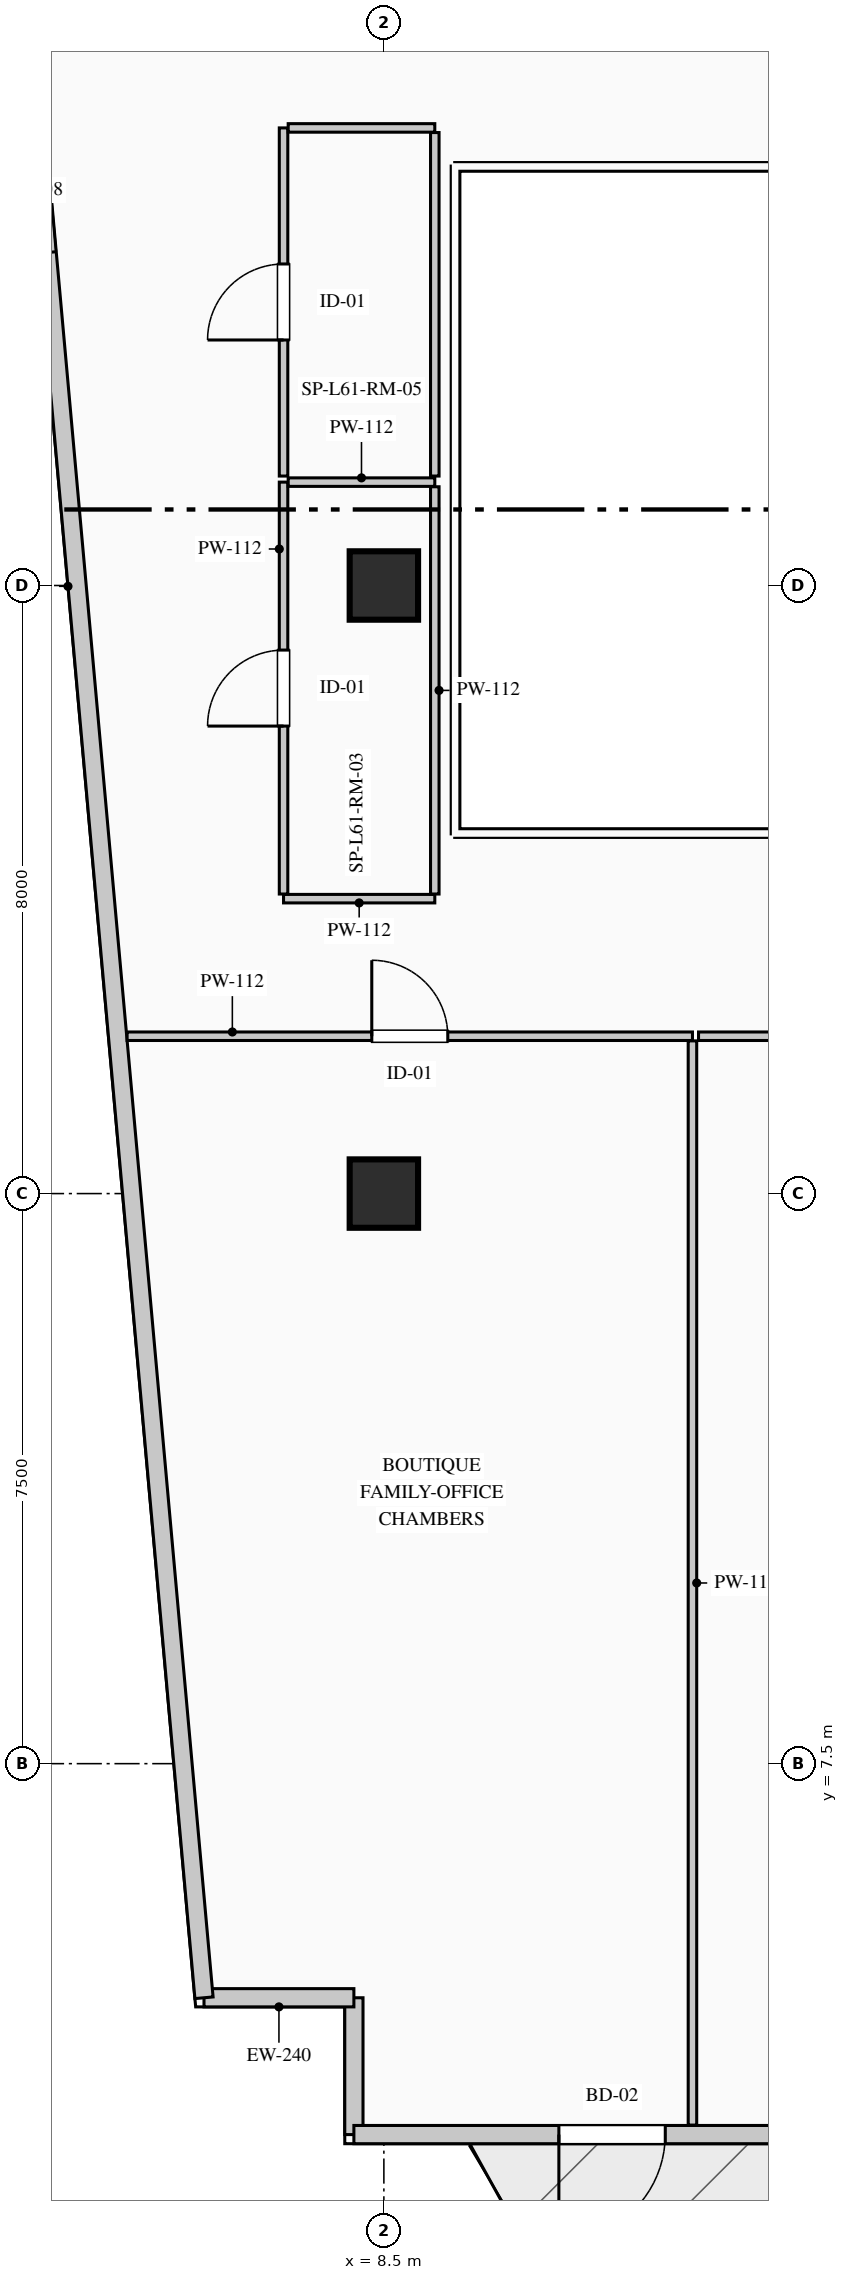
"""IFC4 building model, lengths in metres.
Left out: names, types, materials, properties, quantities, classifications, styles, units other than length and angle.
Written with IfcOpenShell. Run it as: python <this file> out.ifc"""

import sys

from ifc_helpers import new_model, si_unit, direction, frame, frame_2d, origin, origin_2d, place, context, subcontext, project, spatial, rectangle, extrude, element, fill, save


model = new_model("IFC4")
c1 = context("Model", 3, precision=1e-05, world=origin(), true_north=direction((0.0, 1.0)))
c2 = subcontext(c1, "Body", "Model", "MODEL_VIEW")
j1 = project(units=[si_unit("LENGTHUNIT", "METRE"), si_unit("PLANEANGLEUNIT", "RADIAN")], contexts=[c1])
p1 = place(None, origin())
s1 = spatial("IfcSite", under=j1, at=p1, CompositionType="ELEMENT")
p2 = place(p1, origin())
s2 = spatial("IfcBuilding", under=s1, at=p2, CompositionType="ELEMENT")
p3 = place(p2, frame((0.0, 0.0, 256.7)))
s3 = spatial("IfcBuildingStorey", under=s2, at=p3, CompositionType="ELEMENT", Elevation=256.7)
for number, where, z_axis, x_axis in (
    (1, (8.5, 15.0, 0.0), (0.0, 0.0, 1.0), (1.0, 0.0, 0.0)),
    (2, (8.5, 23.0, 0.0), (0.0, 0.0, 1.0), (1.0, 0.0, 0.0)),
):
    element("IfcColumn", number, at=place(p3, frame(where, z_axis=z_axis, x_axis=x_axis)), inside=s3, PredefinedType="COLUMN", context=c2, shape_type="SweptSolid", body=[
        extrude(rectangle(XDim=0.9, YDim=0.9, at=origin_2d()), origin(), (0.0, 0.0, 1.0), 3.95),
    ])
p4 = place(p3, frame((8.105, 2.62, 0.0), z_axis=(0.0, 0.0, 1.0), x_axis=(0.0, 1.0, 0.0)))
e3 = element("IfcWall", 3, at=p4, inside=s3, PredefinedType="STANDARD", context=c2, shape_type="SweptSolid", body=[
    extrude(rectangle(XDim=1.8, YDim=0.24, at=frame_2d((0.9, 0.0))), origin(), (0.0, 0.0, 1.0), 3.7),
])
p5 = place(p3, frame((8.105, 4.42, 0.0), z_axis=(0.0, 0.0, 1.0), x_axis=(-1.0, 0.0, 0.0)))
e4 = element("IfcWall", 4, at=p5, inside=s3, PredefinedType="STANDARD", context=c2, shape_type="SweptSolid", body=[
    extrude(rectangle(XDim=1.972, YDim=0.24, at=frame_2d((0.986, 0.0))), origin(), (0.0, 0.0, 1.0), 3.7),
])
p6 = place(p3, frame((6.133, 4.42, 0.0), z_axis=(0.0, 0.0, 1.0), x_axis=(-0.089522678378, 0.995984784048, 0.0)))
e5 = element("IfcWall", 5, at=p6, inside=s3, PredefinedType="STANDARD", context=c2, shape_type="SweptSolid", body=[
    extrude(rectangle(XDim=37.31, YDim=0.24, at=frame_2d((18.655, 0.0))), origin(), (0.0, 0.0, 1.0), 3.7),
])
p7 = place(p6, frame((23.053, 0.0, 0.9)))
e6 = element("IfcOpeningElement", 6, at=p7, cuts=e5, PredefinedType="OPENING", context=c2, shape_type="SweptSolid", body=[
    extrude(rectangle(XDim=1.65, YDim=1.95, at=frame_2d((0.825, 0.975))), frame((0.0, 0.13, 0.0), z_axis=(0.0, -1.0, 0.0), x_axis=(1.0, 0.0, 0.0)), (0.0, 0.0, 1.0), 0.26),
])
p8 = place(p3, frame((16.513, 2.62, 0.0), z_axis=(0.0, 0.0, 1.0), x_axis=(-1.0, 0.0, 0.0)))
e7 = element("IfcWall", 7, at=p8, inside=s3, PredefinedType="STANDARD", context=c2, shape_type="SweptSolid", body=[
    extrude(rectangle(XDim=8.408, YDim=0.24, at=frame_2d((4.204, 0.0))), origin(), (0.0, 0.0, 1.0), 3.7),
])
p9 = place(p8, frame((4.311, 0.0, 0.0)))
e8 = element("IfcOpeningElement", 8, at=p9, cuts=e7, PredefinedType="OPENING", context=c2, shape_type="SweptSolid", body=[
    extrude(rectangle(XDim=1.4, YDim=2.2, at=frame_2d((0.7, 1.1))), frame((0.0, 0.13, 0.0), z_axis=(0.0, -1.0, 0.0), x_axis=(1.0, 0.0, 0.0)), (0.0, 0.0, 1.0), 0.26),
])
p10 = place(p3, frame((5.122, 17.07, 0.0), z_axis=(0.0, 0.0, 1.0), x_axis=(1.0, 0.0, 0.0)))
e9 = element("IfcWall", 9, at=p10, inside=s3, PredefinedType="PARTITIONING", context=c2, shape_type="SweptSolid", body=[
    extrude(rectangle(XDim=7.438, YDim=0.112, at=frame_2d((3.719, 0.0))), origin(), (0.0, 0.0, 1.0), 3.7),
])
p11 = place(p10, frame((3.219, 0.0, 0.0)))
e10 = element("IfcOpeningElement", 10, at=p11, cuts=e9, PredefinedType="OPENING", context=c2, shape_type="SweptSolid", body=[
    extrude(rectangle(XDim=1.0, YDim=2.15, at=frame_2d((0.5, 1.075))), frame((0.0, 0.066, 0.0), z_axis=(0.0, -1.0, 0.0), x_axis=(1.0, 0.0, 0.0)), (0.0, 0.0, 1.0), 0.132),
])
p12 = place(p3, frame((12.56, 17.009, 0.0), z_axis=(0.0, 0.0, 1.0), x_axis=(0.0, -1.0, 0.0)))
e11 = element("IfcWall", 11, at=p12, inside=s3, PredefinedType="PARTITIONING", context=c2, shape_type="SweptSolid", body=[
    extrude(rectangle(XDim=14.264, YDim=0.112, at=frame_2d((7.132, 0.0))), origin(), (0.0, 0.0, 1.0), 3.7),
])
p13 = place(p3, frame((12.64, 17.07, 0.0), z_axis=(0.0, 0.0, 1.0), x_axis=(1.0, 0.0, 0.0)))
e12 = element("IfcWall", 12, at=p13, inside=s3, PredefinedType="PARTITIONING", context=c2, shape_type="SweptSolid", body=[
    extrude(rectangle(XDim=7.587, YDim=0.112, at=frame_2d((3.793, 0.0))), origin(), (0.0, 0.0, 1.0), 3.7),
])
p14 = place(p13, frame((3.293, 0.0, 0.0)))
e13 = element("IfcOpeningElement", 13, at=p14, cuts=e12, PredefinedType="OPENING", context=c2, shape_type="SweptSolid", body=[
    extrude(rectangle(XDim=1.0, YDim=2.15, at=frame_2d((0.5, 1.075))), frame((0.0, 0.066, 0.0), z_axis=(0.0, -1.0, 0.0), x_axis=(1.0, 0.0, 0.0)), (0.0, 0.0, 1.0), 0.132),
])
p15 = place(p3, frame((9.17, 18.88, 0.0), z_axis=(0.0, 0.0, 1.0), x_axis=(-1.0, 0.0, 0.0)))
e14 = element("IfcWall", 14, at=p15, inside=s3, PredefinedType="PARTITIONING", context=c2, shape_type="SweptSolid", body=[
    extrude(rectangle(XDim=1.99, YDim=0.112, at=frame_2d((0.995, 0.0))), origin(), (0.0, 0.0, 1.0), 3.7),
])
p16 = place(p3, frame((7.18, 18.941, 0.0), z_axis=(0.0, 0.0, 1.0), x_axis=(0.0, 1.0, 0.0)))
e15 = element("IfcWall", 15, at=p16, inside=s3, PredefinedType="PARTITIONING", context=c2, shape_type="SweptSolid", body=[
    extrude(rectangle(XDim=5.419, YDim=0.112, at=frame_2d((2.709, 0.0))), origin(), (0.0, 0.0, 1.0), 3.7),
])
p17 = place(p16, frame((2.209, 0.0, 0.0)))
e16 = element("IfcOpeningElement", 16, at=p17, cuts=e15, PredefinedType="OPENING", context=c2, shape_type="SweptSolid", body=[
    extrude(rectangle(XDim=1.0, YDim=2.15, at=frame_2d((0.5, 1.075))), frame((0.0, 0.066, 0.0), z_axis=(0.0, -1.0, 0.0), x_axis=(1.0, 0.0, 0.0)), (0.0, 0.0, 1.0), 0.132),
])
p18 = place(p3, frame((7.241, 24.36, 0.0), z_axis=(0.0, 0.0, 1.0), x_axis=(1.0, 0.0, 0.0)))
e17 = element("IfcWall", 17, at=p18, inside=s3, PredefinedType="PARTITIONING", context=c2, shape_type="SweptSolid", body=[
    extrude(rectangle(XDim=1.929, YDim=0.112, at=frame_2d((0.964, 0.0))), origin(), (0.0, 0.0, 1.0), 3.7),
])
p19 = place(p3, frame((9.17, 24.299, 0.0), z_axis=(0.0, 0.0, 1.0), x_axis=(0.0, -1.0, 0.0)))
e18 = element("IfcWall", 18, at=p19, inside=s3, PredefinedType="PARTITIONING", context=c2, shape_type="SweptSolid", body=[
    extrude(rectangle(XDim=5.358, YDim=0.112, at=frame_2d((2.679, 0.0))), origin(), (0.0, 0.0, 1.0), 3.385),
])
p20 = place(p3, frame((7.18, 24.44, 0.0), z_axis=(0.0, 0.0, 1.0), x_axis=(0.0, 1.0, 0.0)))
e19 = element("IfcWall", 19, at=p20, inside=s3, PredefinedType="PARTITIONING", context=c2, shape_type="SweptSolid", body=[
    extrude(rectangle(XDim=4.58, YDim=0.112, at=frame_2d((2.29, 0.0))), origin(), (0.0, 0.0, 1.0), 3.7),
])
p21 = place(p20, frame((1.79, 0.0, 0.0)))
e20 = element("IfcOpeningElement", 20, at=p21, cuts=e19, PredefinedType="OPENING", context=c2, shape_type="SweptSolid", body=[
    extrude(rectangle(XDim=1.0, YDim=2.15, at=frame_2d((0.5, 1.075))), frame((0.0, 0.066, 0.0), z_axis=(0.0, -1.0, 0.0), x_axis=(1.0, 0.0, 0.0)), (0.0, 0.0, 1.0), 0.132),
])
p22 = place(p3, frame((7.241, 29.02, 0.0), z_axis=(0.0, 0.0, 1.0), x_axis=(1.0, 0.0, 0.0)))
e21 = element("IfcWall", 21, at=p22, inside=s3, PredefinedType="PARTITIONING", context=c2, shape_type="SweptSolid", body=[
    extrude(rectangle(XDim=1.929, YDim=0.112, at=frame_2d((0.964, 0.0))), origin(), (0.0, 0.0, 1.0), 3.7),
])
p23 = place(p3, frame((9.17, 28.959, 0.0), z_axis=(0.0, 0.0, 1.0), x_axis=(0.0, -1.0, 0.0)))
e22 = element("IfcWall", 22, at=p23, inside=s3, PredefinedType="PARTITIONING", context=c2, shape_type="SweptSolid", body=[
    extrude(rectangle(XDim=4.519, YDim=0.112, at=frame_2d((2.26, 0.0))), origin(), (0.0, 0.0, 1.0), 3.385),
])
p24 = place(p9, origin())
e23 = element("IfcDoor", 23, at=p24, inside=s3, OperationType="SINGLE_SWING_RIGHT", PredefinedType="DOOR", context=c2, shape_type="SweptSolid", body=[
    extrude(rectangle(XDim=1.4, YDim=2.2, at=frame_2d((0.7, 1.1))), frame((0.0, 0.025, 0.0), z_axis=(0.0, -1.0, 0.0), x_axis=(1.0, 0.0, 0.0)), (0.0, 0.0, 1.0), 0.05),
])
fill(e8, e23)
p25 = place(p11, origin())
e24 = element("IfcDoor", 24, at=p25, inside=s3, OperationType="SINGLE_SWING_LEFT", PredefinedType="DOOR", context=c2, shape_type="SweptSolid", body=[
    extrude(rectangle(XDim=1.0, YDim=2.15, at=frame_2d((0.5, 1.075))), frame((0.0, 0.025, 0.0), z_axis=(0.0, -1.0, 0.0), x_axis=(1.0, 0.0, 0.0)), (0.0, 0.0, 1.0), 0.05),
])
fill(e10, e24)
p26 = place(p17, origin())
e25 = element("IfcDoor", 25, at=p26, inside=s3, OperationType="SINGLE_SWING_LEFT", PredefinedType="DOOR", context=c2, shape_type="SweptSolid", body=[
    extrude(rectangle(XDim=1.0, YDim=2.15, at=frame_2d((0.5, 1.075))), frame((0.0, 0.025, 0.0), z_axis=(0.0, -1.0, 0.0), x_axis=(1.0, 0.0, 0.0)), (0.0, 0.0, 1.0), 0.05),
])
fill(e16, e25)
p27 = place(p21, origin())
e26 = element("IfcDoor", 26, at=p27, inside=s3, OperationType="SINGLE_SWING_LEFT", PredefinedType="DOOR", context=c2, shape_type="SweptSolid", body=[
    extrude(rectangle(XDim=1.0, YDim=2.15, at=frame_2d((0.5, 1.075))), frame((0.0, 0.025, 0.0), z_axis=(0.0, -1.0, 0.0), x_axis=(1.0, 0.0, 0.0)), (0.0, 0.0, 1.0), 0.05),
])
fill(e20, e26)
save(model, sys.argv[1])
